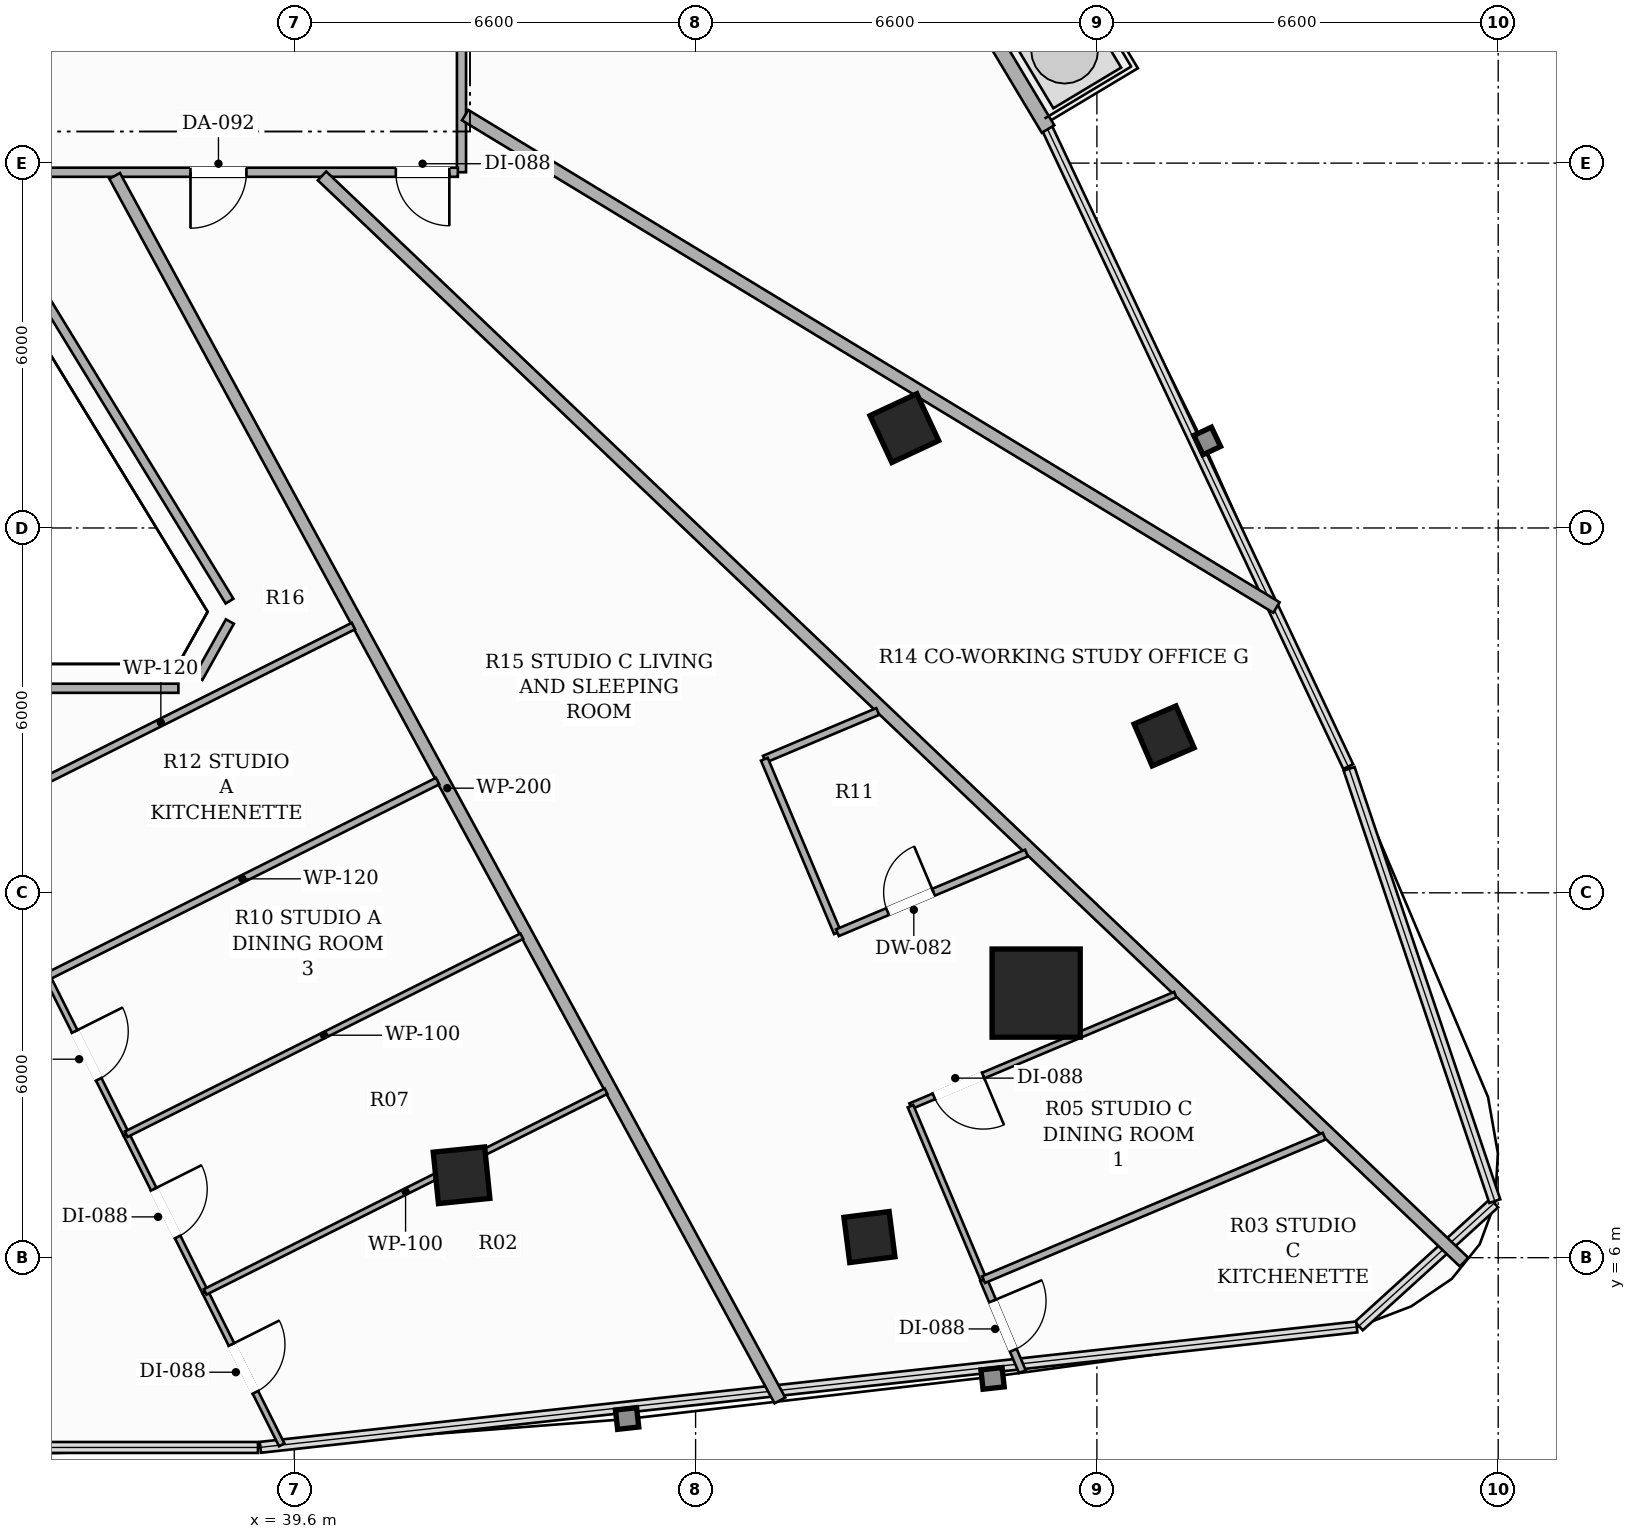
"""IFC4 building model, lengths in metres.
Left out: names, types, materials, properties, quantities, classifications, styles, units other than length and angle.
Written with IfcOpenShell. Run it as: python <this file> out.ifc"""

import sys

from ifc_helpers import new_model, si_unit, direction, frame, frame_2d, origin, origin_2d, place, context, subcontext, project, spatial, rectangle, hollow_rectangle, extrude, element, fill, save


model = new_model("IFC4")
c1 = context("Model", 3, precision=1e-05, world=origin(), true_north=direction((0.0, 1.0)))
c2 = subcontext(c1, "Body", "Model", "MODEL_VIEW")
j1 = project(units=[si_unit("LENGTHUNIT", "METRE"), si_unit("PLANEANGLEUNIT", "RADIAN")], contexts=[c1])
p1 = place(None, origin())
s1 = spatial("IfcSite", under=j1, at=p1, CompositionType="ELEMENT")
p2 = place(p1, origin())
s2 = spatial("IfcBuilding", under=s1, at=p2, CompositionType="ELEMENT")
p3 = place(p2, frame((0.0, 0.0, 110.0)))
s3 = spatial("IfcBuildingStorey", under=s2, at=p3, CompositionType="ELEMENT", Elevation=110.0)
p4 = place(p3, frame((51.801, 10.351, 0.0), z_axis=(0.0, 0.0, 1.0), x_axis=(1.0, 0.0, 0.0)))
e1 = element("IfcColumn", 1, at=p4, inside=s3, PredefinedType="COLUMN", context=c2, shape_type="SweptSolid", body=[
    extrude(hollow_rectangle(XDim=1.45, YDim=1.45, WallThickness=0.045, at=origin_2d()), origin(), (0.0, 0.0, 1.0), 3.3),
])
for number, where, z_axis, x_axis in (
    (2, (42.351, 7.355, 0.0), (0.0, 0.0, 1.0), (0.995, 0.101, 0.0)),
    (3, (49.633, 19.642, 0.0), (0.0, 0.0, 1.0), (-0.423, 0.906, 0.0)),
):
    element("IfcColumn", number, at=place(p3, frame(where, z_axis=z_axis, x_axis=x_axis)), inside=s3, PredefinedType="COLUMN", context=c2, shape_type="SweptSolid", body=[
        extrude(hollow_rectangle(XDim=0.85, YDim=0.85, WallThickness=0.028, at=origin_2d()), origin(), (0.0, 0.0, 1.0), 3.3),
    ])
for number, where, z_axis, x_axis in (
    (4, (49.059, 6.339, 0.0), (0.0, 0.0, 1.0), (0.992, 0.127, 0.0)),
    (5, (53.905, 14.58, 0.0), (0.0, 0.0, 1.0), (-0.397, 0.918, 0.0)),
):
    element("IfcColumn", number, at=place(p3, frame(where, z_axis=z_axis, x_axis=x_axis)), inside=s3, PredefinedType="COLUMN", context=c2, shape_type="SweptSolid", body=[
        extrude(hollow_rectangle(XDim=0.75, YDim=0.75, WallThickness=0.025, at=origin_2d()), origin(), (0.0, 0.0, 1.0), 3.3),
    ])
p5 = place(p3, frame((51.997, 24.561, 0.0), z_axis=(0.0, 0.0, 1.0), x_axis=(-0.514362369366, 0.857572943242, 0.0)))
e6 = element("IfcWall", 6, at=p5, inside=s3, PredefinedType="SOLIDWALL", context=c2, shape_type="SweptSolid", body=[
    extrude(rectangle(XDim=11.844, YDim=0.24, at=frame_2d((5.922, 0.0))), origin(), (0.0, 0.0, 1.0), 2.624),
])
p6 = place(p5, frame((9.346, 0.0, 0.0)))
e7 = element("IfcOpeningElement", 7, at=p6, cuts=e6, PredefinedType="OPENING", context=c2, shape_type="SweptSolid", body=[
    extrude(rectangle(XDim=1.8, YDim=2.2, at=frame_2d((0.9, 1.1))), frame((0.0, 0.13, 0.0), z_axis=(0.0, -1.0, 0.0), x_axis=(1.0, 0.0, 0.0)), (0.0, 0.0, 1.0), 0.26),
])
p7 = place(p3, frame((42.35, 28.34, 0.0), z_axis=(0.0, 0.0, 1.0), x_axis=(0.0, -1.0, 0.0)))
e8 = element("IfcWall", 8, at=p7, inside=s3, PredefinedType="PARTITIONING", context=c2, shape_type="SweptSolid", body=[
    extrude(rectangle(XDim=4.49, YDim=0.15, at=frame_2d((2.245, 0.0))), origin(), (0.0, 0.0, 1.0), 2.721),
])
p8 = place(p7, frame((1.486, 0.0, 0.0)))
e9 = element("IfcOpeningElement", 9, at=p8, cuts=e8, PredefinedType="OPENING", context=c2, shape_type="SweptSolid", body=[
    extrude(rectangle(XDim=0.88, YDim=2.1, at=frame_2d((0.44, 1.05))), frame((0.0, 0.085, 0.0), z_axis=(0.0, -1.0, 0.0), x_axis=(1.0, 0.0, 0.0)), (0.0, 0.0, 1.0), 0.17),
])
p9 = place(p3, frame((42.29, 23.85, 0.0), z_axis=(0.0, 0.0, 1.0), x_axis=(-1.0, 0.0, 0.0)))
e10 = element("IfcWall", 10, at=p9, inside=s3, PredefinedType="PARTITIONING", context=c2, shape_type="SweptSolid", body=[
    extrude(rectangle(XDim=8.065, YDim=0.15, at=frame_2d((4.032, 0.0))), origin(), (0.0, 0.0, 1.0), 2.492),
])
p10 = place(p9, frame((3.477, 0.0, 0.0)))
e11 = element("IfcOpeningElement", 11, at=p10, cuts=e10, PredefinedType="OPENING", context=c2, shape_type="SweptSolid", body=[
    extrude(rectangle(XDim=0.92, YDim=2.15, at=frame_2d((0.46, 1.075))), frame((0.0, 0.085, 0.0), z_axis=(0.0, -1.0, 0.0), x_axis=(1.0, 0.0, 0.0)), (0.0, 0.0, 1.0), 0.17),
])
p11 = place(p9, frame((0.14, 0.0, 0.0)))
e12 = element("IfcOpeningElement", 12, at=p11, cuts=e10, PredefinedType="OPENING", context=c2, shape_type="SweptSolid", body=[
    extrude(rectangle(XDim=0.88, YDim=2.1, at=frame_2d((0.44, 1.05))), frame((0.0, 0.085, 0.0), z_axis=(0.0, -1.0, 0.0), x_axis=(1.0, 0.0, 0.0)), (0.0, 0.0, 1.0), 0.17),
])
p12 = place(p3, frame((34.257, 23.79, 0.0), z_axis=(0.0, 0.0, 1.0), x_axis=(0.521839061235, -0.853043957935, 0.0)))
e13 = element("IfcWall", 13, at=p12, inside=s3, PredefinedType="PARTITIONING", context=c2, shape_type="SweptSolid", body=[
    extrude(rectangle(XDim=8.198, YDim=0.15, at=frame_2d((4.099, 0.0))), origin(), (0.0, 0.0, 1.0), 2.721),
])
p13 = place(p3, frame((38.541, 16.461, 0.0), z_axis=(0.0, 0.0, 1.0), x_axis=(-0.488631416095, -0.872490308946, 0.0)))
e14 = element("IfcWall", 14, at=p13, inside=s3, PredefinedType="PARTITIONING", context=c2, shape_type="SweptSolid", body=[
    extrude(rectangle(XDim=1.06, YDim=0.15, at=frame_2d((0.53, 0.0))), origin(), (0.0, 0.0, 1.0), 3.06),
])
p14 = place(p3, frame((37.694, 15.364, 0.0), z_axis=(0.0, 0.0, 1.0), x_axis=(-1.0, 0.0, 0.0)))
e15 = element("IfcWall", 15, at=p14, inside=s3, PredefinedType="PARTITIONING", context=c2, shape_type="SweptSolid", body=[
    extrude(rectangle(XDim=9.388, YDim=0.15, at=frame_2d((4.694, 0.0))), origin(), (0.0, 0.0, 1.0), 2.721),
])
p15 = place(p3, frame((36.646, 23.79, 0.0), z_axis=(0.0, 0.0, 1.0), x_axis=(0.477391569207, -0.878690667784, 0.0)))
e16 = element("IfcWall", 16, at=p15, inside=s3, PredefinedType="PARTITIONING", context=c2, shape_type="SweptSolid", body=[
    extrude(rectangle(XDim=22.918, YDim=0.2, at=frame_2d((11.459, 0.0))), origin(), (0.0, 0.0, 1.0), 2.413),
])
p16 = place(p3, frame((40.056, 23.79, 0.0), z_axis=(0.0, 0.0, 1.0), x_axis=(0.724633427165, -0.68913452695, 0.0)))
e17 = element("IfcWall", 17, at=p16, inside=s3, PredefinedType="PARTITIONING", context=c2, shape_type="SweptSolid", body=[
    extrude(rectangle(XDim=25.921, YDim=0.2, at=frame_2d((12.96, 0.0))), origin(), (0.0, 0.0, 1.0), 2.413),
])
p17 = place(p3, frame((55.753, 16.692, 0.0), z_axis=(0.0, 0.0, 1.0), x_axis=(-0.85489976131, 0.518793213248, 0.0)))
e18 = element("IfcWall", 18, at=p17, inside=s3, PredefinedType="PARTITIONING", context=c2, shape_type="SweptSolid", body=[
    extrude(rectangle(XDim=15.608, YDim=0.2, at=frame_2d((7.804, 0.0))), origin(), (0.0, 0.0, 1.0), 2.413),
])
p18 = place(p3, frame((38.134, 5.437, 0.0), z_axis=(0.0, 0.0, 1.0), x_axis=(0.447768773835, -0.894149386388, 0.0)))
e19 = element("IfcWall", 19, at=p18, inside=s3, PredefinedType="PARTITIONING", context=c2, shape_type="SweptSolid", body=[
    extrude(rectangle(XDim=2.814, YDim=0.1, at=frame_2d((1.407, 0.0))), origin(), (0.0, 0.0, 1.0), 3.06),
])
p19 = place(p18, frame((0.967, 0.0, 0.0)))
e20 = element("IfcOpeningElement", 20, at=p19, cuts=e19, PredefinedType="OPENING", context=c2, shape_type="SweptSolid", body=[
    extrude(rectangle(XDim=0.88, YDim=2.1, at=frame_2d((0.44, 1.05))), frame((0.0, 0.06, 0.0), z_axis=(0.0, -1.0, 0.0), x_axis=(1.0, 0.0, 0.0)), (0.0, 0.0, 1.0), 0.12),
])
p20 = place(p3, frame((36.836, 8.03, 0.0), z_axis=(0.0, 0.0, 1.0), x_axis=(0.447651342751, -0.894208183441, 0.0)))
e21 = element("IfcWall", 21, at=p20, inside=s3, PredefinedType="PARTITIONING", context=c2, shape_type="SweptSolid", body=[
    extrude(rectangle(XDim=2.9, YDim=0.1, at=frame_2d((1.45, 0.0))), origin(), (0.0, 0.0, 1.0), 2.413),
])
p21 = place(p20, frame((1.01, 0.0, 0.0)))
e22 = element("IfcOpeningElement", 22, at=p21, cuts=e21, PredefinedType="OPENING", context=c2, shape_type="SweptSolid", body=[
    extrude(rectangle(XDim=0.88, YDim=2.1, at=frame_2d((0.44, 1.05))), frame((0.0, 0.06, 0.0), z_axis=(0.0, -1.0, 0.0), x_axis=(1.0, 0.0, 0.0)), (0.0, 0.0, 1.0), 0.12),
])
p22 = place(p3, frame((35.537, 10.623, 0.0), z_axis=(0.0, 0.0, 1.0), x_axis=(0.447853271476, -0.894107066983, 0.0)))
e23 = element("IfcWall", 23, at=p22, inside=s3, PredefinedType="PARTITIONING", context=c2, shape_type="SweptSolid", body=[
    extrude(rectangle(XDim=2.9, YDim=0.1, at=frame_2d((1.45, 0.0))), origin(), (0.0, 0.0, 1.0), 3.06),
])
p23 = place(p22, frame((1.01, 0.0, 0.0)))
e24 = element("IfcOpeningElement", 24, at=p23, cuts=e23, PredefinedType="OPENING", context=c2, shape_type="SweptSolid", body=[
    extrude(rectangle(XDim=0.88, YDim=2.1, at=frame_2d((0.44, 1.05))), frame((0.0, 0.06, 0.0), z_axis=(0.0, -1.0, 0.0), x_axis=(1.0, 0.0, 0.0)), (0.0, 0.0, 1.0), 0.12),
])
p24 = place(p3, frame((40.572, 16.387, 0.0), z_axis=(0.0, 0.0, 1.0), x_axis=(-0.894178861749, -0.447709909653, 0.0)))
e25 = element("IfcWall", 25, at=p24, inside=s3, PredefinedType="PARTITIONING", context=c2, shape_type="SweptSolid", body=[
    extrude(rectangle(XDim=7.083, YDim=0.12, at=frame_2d((3.541, 0.0))), origin(), (0.0, 0.0, 1.0), 2.721),
])
p25 = place(p3, frame((41.957, 13.837, 0.0), z_axis=(0.0, 0.0, 1.0), x_axis=(-0.894209449688, -0.447648813344, 0.0)))
e26 = element("IfcWall", 26, at=p25, inside=s3, PredefinedType="PARTITIONING", context=c2, shape_type="SweptSolid", body=[
    extrude(rectangle(XDim=7.179, YDim=0.12, at=frame_2d((3.59, 0.0))), origin(), (0.0, 0.0, 1.0), 2.721),
])
p26 = place(p3, frame((38.134, 5.437, 0.0), z_axis=(0.0, 0.0, 1.0), x_axis=(0.894182030014, 0.447703581849, 0.0)))
e27 = element("IfcWall", 27, at=p26, inside=s3, PredefinedType="PARTITIONING", context=c2, shape_type="SweptSolid", body=[
    extrude(rectangle(XDim=7.373, YDim=0.1, at=frame_2d((3.687, 0.0))), origin(), (0.0, 0.0, 1.0), 2.413),
])
p27 = place(p3, frame((36.836, 8.03, 0.0), z_axis=(0.0, 0.0, 1.0), x_axis=(0.894205618721, 0.447656465884, 0.0)))
e28 = element("IfcWall", 28, at=p27, inside=s3, PredefinedType="PARTITIONING", context=c2, shape_type="SweptSolid", body=[
    extrude(rectangle(XDim=7.276, YDim=0.1, at=frame_2d((3.638, 0.0))), origin(), (0.0, 0.0, 1.0), 2.721),
])
p28 = place(p3, frame((49.195, 14.982, 0.0), z_axis=(0.0, 0.0, 1.0), x_axis=(-0.921624013763, -0.38808398222, 0.0)))
e29 = element("IfcWall", 29, at=p28, inside=s3, PredefinedType="PARTITIONING", context=c2, shape_type="SweptSolid", body=[
    extrude(rectangle(XDim=2.022, YDim=0.12, at=frame_2d((1.011, 0.0))), origin(), (0.0, 0.0, 1.0), 2.492),
])
p29 = place(p3, frame((47.331, 14.197, 0.0), z_axis=(0.0, 0.0, 1.0), x_axis=(0.388229743903, -0.921562621827, 0.0)))
e30 = element("IfcWall", 30, at=p29, inside=s3, PredefinedType="PARTITIONING", context=c2, shape_type="SweptSolid", body=[
    extrude(rectangle(XDim=3.096, YDim=0.12, at=frame_2d((1.548, 0.0))), origin(), (0.0, 0.0, 1.0), 3.06),
])
p30 = place(p3, frame((48.533, 11.344, 0.0), z_axis=(0.0, 0.0, 1.0), x_axis=(0.921534547548, 0.388296378653, 0.0)))
e31 = element("IfcWall", 31, at=p30, inside=s3, PredefinedType="PARTITIONING", context=c2, shape_type="SweptSolid", body=[
    extrude(rectangle(XDim=3.374, YDim=0.12, at=frame_2d((1.687, 0.0))), origin(), (0.0, 0.0, 1.0), 2.492),
])
p31 = place(p30, frame((0.894, 0.0, 0.0)))
e32 = element("IfcOpeningElement", 32, at=p31, cuts=e31, PredefinedType="OPENING", context=c2, shape_type="SweptSolid", body=[
    extrude(rectangle(XDim=0.82, YDim=2.1, at=frame_2d((0.41, 1.05))), frame((0.0, 0.07, 0.0), z_axis=(0.0, -1.0, 0.0), x_axis=(1.0, 0.0, 0.0)), (0.0, 0.0, 1.0), 0.14),
])
p32 = place(p3, frame((50.936, 5.639, 0.0), z_axis=(0.0, 0.0, 1.0), x_axis=(0.3883160894, -0.92152624201, 0.0)))
e33 = element("IfcWall", 33, at=p32, inside=s3, PredefinedType="PARTITIONING", context=c2, shape_type="SweptSolid", body=[
    extrude(rectangle(XDim=1.643, YDim=0.12, at=frame_2d((0.821, 0.0))), origin(), (0.0, 0.0, 1.0), 2.619),
])
p33 = place(p32, frame((0.381, 0.0, 0.0)))
e34 = element("IfcOpeningElement", 34, at=p33, cuts=e33, PredefinedType="OPENING", context=c2, shape_type="SweptSolid", body=[
    extrude(rectangle(XDim=0.88, YDim=2.1, at=frame_2d((0.44, 1.05))), frame((0.0, 0.07, 0.0), z_axis=(0.0, -1.0, 0.0), x_axis=(1.0, 0.0, 0.0)), (0.0, 0.0, 1.0), 0.14),
])
p34 = place(p3, frame((54.09, 10.326, 0.0), z_axis=(0.0, 0.0, 1.0), x_axis=(-0.921538100995, -0.388287945234, 0.0)))
e35 = element("IfcWall", 35, at=p34, inside=s3, PredefinedType="PARTITIONING", context=c2, shape_type="SweptSolid", body=[
    extrude(rectangle(XDim=4.726, YDim=0.1, at=frame_2d((2.363, 0.0))), origin(), (0.0, 0.0, 1.0), 2.413),
])
p35 = place(p34, frame((3.429, 0.0, 0.0)))
e36 = element("IfcOpeningElement", 36, at=p35, cuts=e35, PredefinedType="OPENING", context=c2, shape_type="SweptSolid", body=[
    extrude(rectangle(XDim=0.88, YDim=2.1, at=frame_2d((0.44, 1.05))), frame((0.0, 0.06, 0.0), z_axis=(0.0, -1.0, 0.0), x_axis=(1.0, 0.0, 0.0)), (0.0, 0.0, 1.0), 0.12),
])
p36 = place(p3, frame((49.735, 8.491, 0.0), z_axis=(0.0, 0.0, 1.0), x_axis=(0.388074634892, -0.921627949746, 0.0)))
e37 = element("IfcWall", 37, at=p36, inside=s3, PredefinedType="PARTITIONING", context=c2, shape_type="SweptSolid", body=[
    extrude(rectangle(XDim=3.094, YDim=0.1, at=frame_2d((1.547, 0.0))), origin(), (0.0, 0.0, 1.0), 2.413),
])
p37 = place(p3, frame((50.936, 5.639, 0.0), z_axis=(0.0, 0.0, 1.0), x_axis=(0.921613448603, 0.388109071466, 0.0)))
e38 = element("IfcWall", 38, at=p37, inside=s3, PredefinedType="PARTITIONING", context=c2, shape_type="SweptSolid", body=[
    extrude(rectangle(XDim=6.079, YDim=0.12, at=frame_2d((3.039, 0.0))), origin(), (0.0, 0.0, 1.0), 2.619),
])
p38 = place(p19, origin())
e39 = element("IfcDoor", 39, at=p38, inside=s3, OperationType="SINGLE_SWING_LEFT", PredefinedType="DOOR", context=c2, shape_type="SweptSolid", body=[
    extrude(rectangle(XDim=0.88, YDim=2.1, at=frame_2d((0.44, 1.05))), frame((0.0, 0.025, 0.0), z_axis=(0.0, -1.0, 0.0), x_axis=(1.0, 0.0, 0.0)), (0.0, 0.0, 1.0), 0.05),
])
fill(e20, e39)
p39 = place(p21, origin())
e40 = element("IfcDoor", 40, at=p39, inside=s3, OperationType="SINGLE_SWING_LEFT", PredefinedType="DOOR", context=c2, shape_type="SweptSolid", body=[
    extrude(rectangle(XDim=0.88, YDim=2.1, at=frame_2d((0.44, 1.05))), frame((0.0, 0.025, 0.0), z_axis=(0.0, -1.0, 0.0), x_axis=(1.0, 0.0, 0.0)), (0.0, 0.0, 1.0), 0.05),
])
fill(e22, e40)
p40 = place(p23, origin())
e41 = element("IfcDoor", 41, at=p40, inside=s3, OperationType="SINGLE_SWING_LEFT", PredefinedType="DOOR", context=c2, shape_type="SweptSolid", body=[
    extrude(rectangle(XDim=0.88, YDim=2.1, at=frame_2d((0.44, 1.05))), frame((0.0, 0.025, 0.0), z_axis=(0.0, -1.0, 0.0), x_axis=(1.0, 0.0, 0.0)), (0.0, 0.0, 1.0), 0.05),
])
fill(e24, e41)
p41 = place(p10, origin())
e42 = element("IfcDoor", 42, at=p41, inside=s3, OperationType="SINGLE_SWING_RIGHT", PredefinedType="DOOR", context=c2, shape_type="SweptSolid", body=[
    extrude(rectangle(XDim=0.92, YDim=2.15, at=frame_2d((0.46, 1.075))), frame((0.0, 0.025, 0.0), z_axis=(0.0, -1.0, 0.0), x_axis=(1.0, 0.0, 0.0)), (0.0, 0.0, 1.0), 0.05),
])
fill(e11, e42)
p42 = place(p31, origin())
e43 = element("IfcDoor", 43, at=p42, inside=s3, OperationType="SINGLE_SWING_RIGHT", PredefinedType="DOOR", context=c2, shape_type="SweptSolid", body=[
    extrude(rectangle(XDim=0.82, YDim=2.1, at=frame_2d((0.41, 1.05))), frame((0.0, 0.025, 0.0), z_axis=(0.0, -1.0, 0.0), x_axis=(1.0, 0.0, 0.0)), (0.0, 0.0, 1.0), 0.05),
])
fill(e32, e43)
p43 = place(p33, origin())
e44 = element("IfcDoor", 44, at=p43, inside=s3, OperationType="SINGLE_SWING_LEFT", PredefinedType="DOOR", context=c2, shape_type="SweptSolid", body=[
    extrude(rectangle(XDim=0.88, YDim=2.1, at=frame_2d((0.44, 1.05))), frame((0.0, 0.025, 0.0), z_axis=(0.0, -1.0, 0.0), x_axis=(1.0, 0.0, 0.0)), (0.0, 0.0, 1.0), 0.05),
])
fill(e34, e44)
p44 = place(p35, origin())
e45 = element("IfcDoor", 45, at=p44, inside=s3, OperationType="SINGLE_SWING_LEFT", PredefinedType="DOOR", context=c2, shape_type="SweptSolid", body=[
    extrude(rectangle(XDim=0.88, YDim=2.1, at=frame_2d((0.44, 1.05))), frame((0.0, 0.025, 0.0), z_axis=(0.0, -1.0, 0.0), x_axis=(1.0, 0.0, 0.0)), (0.0, 0.0, 1.0), 0.05),
])
fill(e36, e45)
p45 = place(p11, origin())
e46 = element("IfcDoor", 46, at=p45, inside=s3, OperationType="SINGLE_SWING_LEFT", PredefinedType="DOOR", context=c2, shape_type="SweptSolid", body=[
    extrude(rectangle(XDim=0.88, YDim=2.1, at=frame_2d((0.44, 1.05))), frame((0.0, 0.025, 0.0), z_axis=(0.0, -1.0, 0.0), x_axis=(1.0, 0.0, 0.0)), (0.0, 0.0, 1.0), 0.05),
])
fill(e12, e46)
save(model, sys.argv[1])
